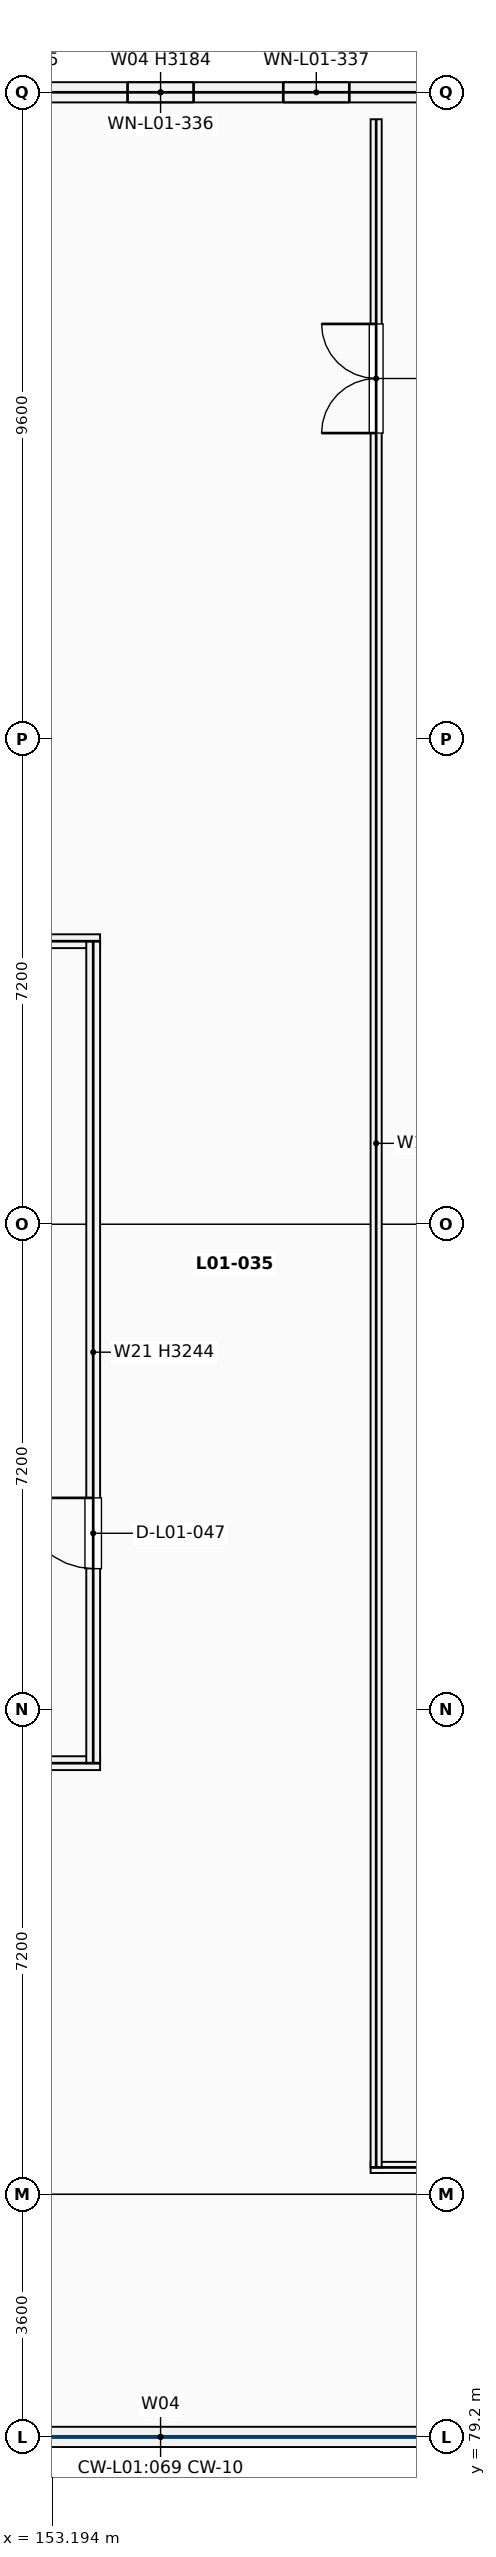
"""IFC4 building model, lengths in metres.
Left out: names, types, materials, properties, quantities, classifications, styles, units other than length and angle.
Written with IfcOpenShell. Run it as: python <this file> out.ifc"""

import sys

from ifc_helpers import new_model, si_unit, direction, frame, frame_2d, origin, place, context, subcontext, project, spatial, rectangle, extrude, element, fill, save


model = new_model("IFC4")
c1 = context("Model", 3, precision=1e-05, world=origin(), true_north=direction((0.0, 1.0)))
c2 = subcontext(c1, "Body", "Model", "MODEL_VIEW")
j1 = project(units=[si_unit("LENGTHUNIT", "METRE"), si_unit("PLANEANGLEUNIT", "RADIAN")], contexts=[c1])
p1 = place(None, origin())
s1 = spatial("IfcSite", under=j1, at=p1, CompositionType="ELEMENT")
p2 = place(p1, origin())
s2 = spatial("IfcBuilding", under=s1, at=p2, CompositionType="ELEMENT")
p3 = place(p2, frame((0.0, 0.0, 5.1)))
s3 = spatial("IfcBuildingStorey", under=s2, at=p3, CompositionType="ELEMENT", Elevation=5.1)
p4 = place(p3, frame((150.227, 114.0, 0.0), z_axis=(0.0, 0.0, 1.0), x_axis=(1.0, 0.0, 0.0)))
e1 = element("IfcWall", 1, at=p4, inside=s3, PredefinedType="SOLIDWALL", context=c2, shape_type="SweptSolid", body=[
    extrude(rectangle(XDim=9.146, YDim=0.3, at=frame_2d((4.573, 0.0))), origin(), (0.0, 0.0, 1.0), 3.184),
])
p5 = place(p4, frame((1.771, 0.0, 0.75)))
e2 = element("IfcOpeningElement", 2, at=p5, cuts=e1, PredefinedType="OPENING", context=c2, shape_type="SweptSolid", body=[
    extrude(rectangle(XDim=0.98, YDim=2.28, at=frame_2d((0.49, 1.14))), frame((0.0, 0.16, 0.0), z_axis=(0.0, -1.0, 0.0), x_axis=(1.0, 0.0, 0.0)), (0.0, 0.0, 1.0), 0.32),
])
p6 = place(p4, frame((4.083, 0.0, 0.75)))
e3 = element("IfcOpeningElement", 3, at=p6, cuts=e1, PredefinedType="OPENING", context=c2, shape_type="SweptSolid", body=[
    extrude(rectangle(XDim=0.98, YDim=2.28, at=frame_2d((0.49, 1.14))), frame((0.0, 0.16, 0.0), z_axis=(0.0, -1.0, 0.0), x_axis=(1.0, 0.0, 0.0)), (0.0, 0.0, 1.0), 0.32),
])
p7 = place(p4, frame((6.395, 0.0, 0.75)))
e4 = element("IfcOpeningElement", 4, at=p7, cuts=e1, PredefinedType="OPENING", context=c2, shape_type="SweptSolid", body=[
    extrude(rectangle(XDim=0.98, YDim=2.28, at=frame_2d((0.49, 1.14))), frame((0.0, 0.16, 0.0), z_axis=(0.0, -1.0, 0.0), x_axis=(1.0, 0.0, 0.0)), (0.0, 0.0, 1.0), 0.32),
])
p8 = place(p3, frame((150.752, 79.2, 0.0), z_axis=(0.0, 0.0, 1.0), x_axis=(1.0, 0.0, 0.0)))
e5 = element("IfcWall", 5, at=p8, inside=s3, PredefinedType="SOLIDWALL", context=c2, shape_type="SweptSolid", body=[
    extrude(rectangle(XDim=8.096, YDim=0.3, at=frame_2d((4.048, 0.0))), origin(), (0.0, 0.0, 1.0), 0.85),
])
for number, where, z_axis, x_axis in (
    (6, (142.298, 89.2, 0.0), (0.0, 0.0, 1.0), (1.0, 0.0, 0.0)),
    (7, (142.298, 101.4, 0.0), (0.0, 0.0, 1.0), (1.0, 0.0, 0.0)),
):
    element("IfcWall", number, at=place(p3, frame(where, z_axis=z_axis, x_axis=x_axis)), inside=s3, PredefinedType="PARTITIONING", context=c2, shape_type="SweptSolid", body=[
        extrude(rectangle(XDim=11.605, YDim=0.205, at=frame_2d((5.802, 0.0))), origin(), (0.0, 0.0, 1.0), 3.184),
    ])
p9 = place(p3, frame((153.8, 89.2, 0.0), z_axis=(0.0, 0.0, 1.0), x_axis=(0.0, 1.0, 0.0)))
e8 = element("IfcWall", 8, at=p9, inside=s3, PredefinedType="PARTITIONING", context=c2, shape_type="SweptSolid", body=[
    extrude(rectangle(XDim=12.2, YDim=0.205, at=frame_2d((6.1, 0.0))), origin(), (0.0, 0.0, 1.0), 3.244),
])
p10 = place(p9, frame((2.887, 0.0, 0.0)))
e9 = element("IfcOpeningElement", 9, at=p10, cuts=e8, PredefinedType="OPENING", context=c2, shape_type="SweptSolid", body=[
    extrude(rectangle(XDim=1.05, YDim=2.15, at=frame_2d((0.525, 1.075))), frame((0.0, 0.113, 0.0), z_axis=(0.0, -1.0, 0.0), x_axis=(1.0, 0.0, 0.0)), (0.0, 0.0, 1.0), 0.225),
])
p11 = place(p3, frame((157.917, 83.2, 0.0), z_axis=(0.0, 0.0, 1.0), x_axis=(1.0, 0.0, 0.0)))
e10 = element("IfcWall", 10, at=p11, inside=s3, PredefinedType="PARTITIONING", context=c2, shape_type="SweptSolid", body=[
    extrude(rectangle(XDim=7.165, YDim=0.165, at=frame_2d((3.583, 0.0))), origin(), (0.0, 0.0, 1.0), 3.184),
])
p12 = place(p3, frame((158.0, 83.2, 0.0), z_axis=(0.0, 0.0, 1.0), x_axis=(0.0, 1.0, 0.0)))
e11 = element("IfcWall", 11, at=p12, inside=s3, PredefinedType="PARTITIONING", context=c2, shape_type="SweptSolid", body=[
    extrude(rectangle(XDim=30.4, YDim=0.165, at=frame_2d((15.2, 0.0))), origin(), (0.0, 0.0, 1.0), 3.244),
])
p13 = place(p12, frame((25.742, 0.0, 0.0)))
e12 = element("IfcOpeningElement", 12, at=p13, cuts=e11, PredefinedType="OPENING", context=c2, shape_type="SweptSolid", body=[
    extrude(rectangle(XDim=1.62, YDim=2.32, at=frame_2d((0.81, 1.16))), frame((0.0, 0.093, 0.0), z_axis=(0.0, -1.0, 0.0), x_axis=(1.0, 0.0, 0.0)), (0.0, 0.0, 1.0), 0.185),
])
p14 = place(p6, origin())
e13 = element("IfcWindow", 13, at=p14, inside=s3, PartitioningType="SINGLE_PANEL", PredefinedType="WINDOW", context=c2, shape_type="SweptSolid", body=[
    extrude(rectangle(XDim=0.98, YDim=2.28, at=frame_2d((0.49, 1.14))), frame((0.0, 0.03, 0.0), z_axis=(0.0, -1.0, 0.0), x_axis=(1.0, 0.0, 0.0)), (0.0, 0.0, 1.0), 0.06),
])
fill(e3, e13)
p15 = place(p7, origin())
e14 = element("IfcWindow", 14, at=p15, inside=s3, PartitioningType="SINGLE_PANEL", PredefinedType="WINDOW", context=c2, shape_type="SweptSolid", body=[
    extrude(rectangle(XDim=0.98, YDim=2.28, at=frame_2d((0.49, 1.14))), frame((0.0, 0.03, 0.0), z_axis=(0.0, -1.0, 0.0), x_axis=(1.0, 0.0, 0.0)), (0.0, 0.0, 1.0), 0.06),
])
fill(e4, e14)
p16 = place(p10, origin())
e15 = element("IfcDoor", 15, at=p16, inside=s3, OperationType="SINGLE_SWING_RIGHT", PredefinedType="DOOR", context=c2, shape_type="SweptSolid", body=[
    extrude(rectangle(XDim=1.05, YDim=2.15, at=frame_2d((0.525, 1.075))), frame((0.0, 0.025, 0.0), z_axis=(0.0, -1.0, 0.0), x_axis=(1.0, 0.0, 0.0)), (0.0, 0.0, 1.0), 0.05),
])
fill(e9, e15)
p17 = place(p13, origin())
e16 = element("IfcDoor", 16, at=p17, inside=s3, OperationType="DOUBLE_DOOR_SINGLE_SWING", PredefinedType="DOOR", context=c2, shape_type="SweptSolid", body=[
    extrude(rectangle(XDim=1.62, YDim=2.32, at=frame_2d((0.81, 1.16))), frame((0.0, 0.025, 0.0), z_axis=(0.0, -1.0, 0.0), x_axis=(1.0, 0.0, 0.0)), (0.0, 0.0, 1.0), 0.05),
])
fill(e12, e16)
save(model, sys.argv[1])
